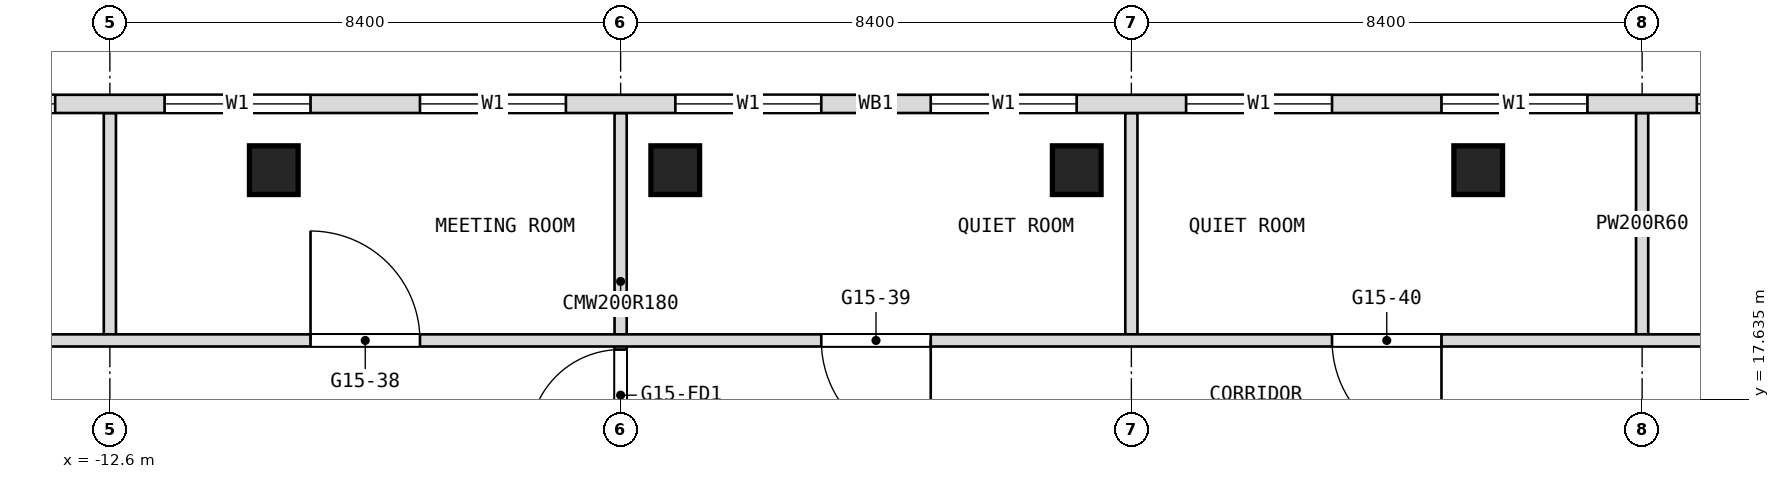
"""IFC4 building model, lengths in metres.
Left out: names, types, materials, properties, quantities, classifications, styles, units other than length and angle.
Written with IfcOpenShell. Run it as: python <this file> out.ifc"""

import sys

from ifc_helpers import new_model, si_unit, direction, frame, frame_2d, origin, origin_2d, place, context, subcontext, project, spatial, rectangle, extrude, element, fill, save


model = new_model("IFC4")
c1 = context("Model", 3, precision=1e-05, world=origin(), true_north=direction((0.0, 1.0)))
c2 = subcontext(c1, "Body", "Model", "MODEL_VIEW")
j1 = project(units=[si_unit("LENGTHUNIT", "METRE"), si_unit("PLANEANGLEUNIT", "RADIAN")], contexts=[c1])
p1 = place(None, origin())
s1 = spatial("IfcSite", under=j1, at=p1, CompositionType="ELEMENT")
p2 = place(p1, origin())
s2 = spatial("IfcBuilding", under=s1, at=p2, CompositionType="ELEMENT")
p3 = place(p2, frame((0.0, 0.0, 194.9)))
s3 = spatial("IfcBuildingStorey", under=s2, at=p3, CompositionType="ELEMENT", Elevation=194.9)
for number, where, z_axis, x_axis in (
    (1, (-9.904, 21.4, 0.0), (0.0, 0.0, 1.0), (1.0, 0.0, 0.0)),
    (2, (-3.302, 21.4, 0.0), (0.0, 0.0, 1.0), (1.0, 0.0, 0.0)),
    (3, (3.302, 21.4, 0.0), (0.0, 0.0, 1.0), (1.0, 0.0, 0.0)),
    (4, (9.904, 21.4, 0.0), (0.0, 0.0, 1.0), (1.0, 0.0, 0.0)),
):
    element("IfcColumn", number, at=place(p3, frame(where, z_axis=z_axis, x_axis=x_axis)), inside=s3, PredefinedType="COLUMN", context=c2, shape_type="SweptSolid", body=[
        extrude(rectangle(XDim=0.8, YDim=0.8, at=origin_2d()), origin(), (0.0, 0.0, 1.0), 3.6),
    ])
for number, where, z_axis, x_axis in (
    (5, (12.6, 18.7, 0.0), (0.0, 0.0, 1.0), (0.0, 1.0, 0.0)),
    (6, (4.2, 18.7, 0.0), (0.0, 0.0, 1.0), (0.0, 1.0, 0.0)),
):
    element("IfcWall", number, at=place(p3, frame(where, z_axis=z_axis, x_axis=x_axis)), inside=s3, PredefinedType="PARTITIONING", context=c2, shape_type="SweptSolid", body=[
        extrude(rectangle(XDim=3.64, YDim=0.2, at=frame_2d((1.82, 0.0))), origin(), (0.0, 0.0, 1.0), 3.34),
    ])
p4 = place(p3, frame((-4.2, 16.8, 0.0), z_axis=(0.0, 0.0, 1.0), x_axis=(0.0, 1.0, 0.0)))
e7 = element("IfcWall", 7, at=p4, inside=s3, PredefinedType="PARTITIONING", context=c2, shape_type="SweptSolid", body=[
    extrude(rectangle(XDim=5.54, YDim=0.2, at=frame_2d((2.77, 0.0))), origin(), (0.0, 0.0, 1.0), 3.34),
])
p5 = place(p4, frame((0.15, 0.0, 0.0)))
e8 = element("IfcOpeningElement", 8, at=p5, cuts=e7, PredefinedType="OPENING", context=c2, shape_type="SweptSolid", body=[
    extrude(rectangle(XDim=1.5, YDim=2.1, at=frame_2d((0.75, 1.05))), frame((0.0, 0.1, 0.0), z_axis=(0.0, -1.0, 0.0), x_axis=(1.0, 0.0, 0.0)), (0.0, 0.0, 1.0), 0.2),
])
p6 = place(p3, frame((-12.6, 18.7, 0.0), z_axis=(0.0, 0.0, 1.0), x_axis=(0.0, 1.0, 0.0)))
e9 = element("IfcWall", 9, at=p6, inside=s3, PredefinedType="PARTITIONING", context=c2, shape_type="SweptSolid", body=[
    extrude(rectangle(XDim=3.64, YDim=0.2, at=frame_2d((1.82, 0.0))), origin(), (0.0, 0.0, 1.0), 3.34),
])
p7 = place(p3, frame((-16.9, 18.6, 0.0), z_axis=(0.0, 0.0, 1.0), x_axis=(1.0, 0.0, 0.0)))
e10 = element("IfcWall", 10, at=p7, inside=s3, PredefinedType="PARTITIONING", context=c2, shape_type="SweptSolid", body=[
    extrude(rectangle(XDim=33.8, YDim=0.2, at=frame_2d((16.9, 0.0))), origin(), (0.0, 0.0, 1.0), 3.34),
])
p8 = place(p7, frame((1.7, 0.0, 0.0)))
e11 = element("IfcOpeningElement", 11, at=p8, cuts=e10, PredefinedType="OPENING", context=c2, shape_type="SweptSolid", body=[
    extrude(rectangle(XDim=1.0, YDim=2.1, at=frame_2d((0.5, 1.05))), frame((0.0, 0.1, 0.0), z_axis=(0.0, -1.0, 0.0), x_axis=(1.0, 0.0, 0.0)), (0.0, 0.0, 1.0), 0.2),
])
p9 = place(p7, frame((7.6, 0.0, 0.0)))
e12 = element("IfcOpeningElement", 12, at=p9, cuts=e10, PredefinedType="OPENING", context=c2, shape_type="SweptSolid", body=[
    extrude(rectangle(XDim=1.8, YDim=2.1, at=frame_2d((0.9, 1.05))), frame((0.0, 0.1, 0.0), z_axis=(0.0, -1.0, 0.0), x_axis=(1.0, 0.0, 0.0)), (0.0, 0.0, 1.0), 0.2),
])
p10 = place(p7, frame((16.0, 0.0, 0.0)))
e13 = element("IfcOpeningElement", 13, at=p10, cuts=e10, PredefinedType="OPENING", context=c2, shape_type="SweptSolid", body=[
    extrude(rectangle(XDim=1.8, YDim=2.1, at=frame_2d((0.9, 1.05))), frame((0.0, 0.1, 0.0), z_axis=(0.0, -1.0, 0.0), x_axis=(1.0, 0.0, 0.0)), (0.0, 0.0, 1.0), 0.2),
])
p11 = place(p7, frame((24.4, 0.0, 0.0)))
e14 = element("IfcOpeningElement", 14, at=p11, cuts=e10, PredefinedType="OPENING", context=c2, shape_type="SweptSolid", body=[
    extrude(rectangle(XDim=1.8, YDim=2.1, at=frame_2d((0.9, 1.05))), frame((0.0, 0.1, 0.0), z_axis=(0.0, -1.0, 0.0), x_axis=(1.0, 0.0, 0.0)), (0.0, 0.0, 1.0), 0.2),
])
p12 = place(p7, frame((31.1, 0.0, 0.0)))
e15 = element("IfcOpeningElement", 15, at=p12, cuts=e10, PredefinedType="OPENING", context=c2, shape_type="SweptSolid", body=[
    extrude(rectangle(XDim=1.0, YDim=2.1, at=frame_2d((0.5, 1.05))), frame((0.0, 0.1, 0.0), z_axis=(0.0, -1.0, 0.0), x_axis=(1.0, 0.0, 0.0)), (0.0, 0.0, 1.0), 0.2),
])
p13 = place(p3, frame((19.206, 22.49, 0.0), z_axis=(0.0, 0.0, 1.0), x_axis=(-1.0, 0.0, 0.0)))
e16 = element("IfcWall", 16, at=p13, inside=s3, PredefinedType="NOTDEFINED", context=c2, shape_type="SweptSolid", body=[
    extrude(rectangle(XDim=38.412, YDim=0.3, at=frame_2d((19.206, 0.0))), origin(), (0.0, 0.0, 1.0), 3.6),
])
p14 = place(p13, frame((3.306, 0.0, 0.9)))
e17 = element("IfcOpeningElement", 17, at=p14, cuts=e16, PredefinedType="OPENING", context=c2, shape_type="SweptSolid", body=[
    extrude(rectangle(XDim=2.4, YDim=2.1, at=frame_2d((1.2, 1.05))), frame((0.0, 0.15, 0.0), z_axis=(0.0, -1.0, 0.0), x_axis=(1.0, 0.0, 0.0)), (0.0, 0.0, 1.0), 0.3),
])
p15 = place(p13, frame((7.506, 0.0, 0.9)))
e18 = element("IfcOpeningElement", 18, at=p15, cuts=e16, PredefinedType="OPENING", context=c2, shape_type="SweptSolid", body=[
    extrude(rectangle(XDim=2.4, YDim=2.1, at=frame_2d((1.2, 1.05))), frame((0.0, 0.15, 0.0), z_axis=(0.0, -1.0, 0.0), x_axis=(1.0, 0.0, 0.0)), (0.0, 0.0, 1.0), 0.3),
])
p16 = place(p13, frame((11.706, 0.0, 0.9)))
e19 = element("IfcOpeningElement", 19, at=p16, cuts=e16, PredefinedType="OPENING", context=c2, shape_type="SweptSolid", body=[
    extrude(rectangle(XDim=2.4, YDim=2.1, at=frame_2d((1.2, 1.05))), frame((0.0, 0.15, 0.0), z_axis=(0.0, -1.0, 0.0), x_axis=(1.0, 0.0, 0.0)), (0.0, 0.0, 1.0), 0.3),
])
p17 = place(p13, frame((15.906, 0.0, 0.9)))
e20 = element("IfcOpeningElement", 20, at=p17, cuts=e16, PredefinedType="OPENING", context=c2, shape_type="SweptSolid", body=[
    extrude(rectangle(XDim=2.4, YDim=2.1, at=frame_2d((1.2, 1.05))), frame((0.0, 0.15, 0.0), z_axis=(0.0, -1.0, 0.0), x_axis=(1.0, 0.0, 0.0)), (0.0, 0.0, 1.0), 0.3),
])
p18 = place(p13, frame((20.106, 0.0, 0.9)))
e21 = element("IfcOpeningElement", 21, at=p18, cuts=e16, PredefinedType="OPENING", context=c2, shape_type="SweptSolid", body=[
    extrude(rectangle(XDim=2.4, YDim=2.1, at=frame_2d((1.2, 1.05))), frame((0.0, 0.15, 0.0), z_axis=(0.0, -1.0, 0.0), x_axis=(1.0, 0.0, 0.0)), (0.0, 0.0, 1.0), 0.3),
])
p19 = place(p13, frame((24.306, 0.0, 0.9)))
e22 = element("IfcOpeningElement", 22, at=p19, cuts=e16, PredefinedType="OPENING", context=c2, shape_type="SweptSolid", body=[
    extrude(rectangle(XDim=2.4, YDim=2.1, at=frame_2d((1.2, 1.05))), frame((0.0, 0.15, 0.0), z_axis=(0.0, -1.0, 0.0), x_axis=(1.0, 0.0, 0.0)), (0.0, 0.0, 1.0), 0.3),
])
p20 = place(p13, frame((28.506, 0.0, 0.9)))
e23 = element("IfcOpeningElement", 23, at=p20, cuts=e16, PredefinedType="OPENING", context=c2, shape_type="SweptSolid", body=[
    extrude(rectangle(XDim=2.4, YDim=2.1, at=frame_2d((1.2, 1.05))), frame((0.0, 0.15, 0.0), z_axis=(0.0, -1.0, 0.0), x_axis=(1.0, 0.0, 0.0)), (0.0, 0.0, 1.0), 0.3),
])
p21 = place(p13, frame((32.706, 0.0, 0.9)))
e24 = element("IfcOpeningElement", 24, at=p21, cuts=e16, PredefinedType="OPENING", context=c2, shape_type="SweptSolid", body=[
    extrude(rectangle(XDim=2.4, YDim=2.1, at=frame_2d((1.2, 1.05))), frame((0.0, 0.15, 0.0), z_axis=(0.0, -1.0, 0.0), x_axis=(1.0, 0.0, 0.0)), (0.0, 0.0, 1.0), 0.3),
])
p22 = place(p9, origin())
e25 = element("IfcDoor", 25, at=p22, inside=s3, OperationType="DOUBLE_DOOR_SINGLE_SWING", PredefinedType="DOOR", context=c2, shape_type="SweptSolid", body=[
    extrude(rectangle(XDim=1.8, YDim=2.1, at=frame_2d((0.9, 1.05))), frame((0.0, 0.025, 0.0), z_axis=(0.0, -1.0, 0.0), x_axis=(1.0, 0.0, 0.0)), (0.0, 0.0, 1.0), 0.05),
])
fill(e12, e25)
p23 = place(p10, origin())
e26 = element("IfcDoor", 26, at=p23, inside=s3, OperationType="DOUBLE_DOOR_SINGLE_SWING", PredefinedType="DOOR", context=c2, shape_type="SweptSolid", body=[
    extrude(rectangle(XDim=1.8, YDim=2.1, at=frame_2d((0.9, 1.05))), frame((0.0, 0.025, 0.0), z_axis=(0.0, -1.0, 0.0), x_axis=(1.0, 0.0, 0.0)), (0.0, 0.0, 1.0), 0.05),
])
fill(e13, e26)
p24 = place(p11, origin())
e27 = element("IfcDoor", 27, at=p24, inside=s3, OperationType="DOUBLE_DOOR_SINGLE_SWING", PredefinedType="DOOR", context=c2, shape_type="SweptSolid", body=[
    extrude(rectangle(XDim=1.8, YDim=2.1, at=frame_2d((0.9, 1.05))), frame((0.0, 0.025, 0.0), z_axis=(0.0, -1.0, 0.0), x_axis=(1.0, 0.0, 0.0)), (0.0, 0.0, 1.0), 0.05),
])
fill(e14, e27)
p25 = place(p14, origin())
e28 = element("IfcWindow", 28, at=p25, inside=s3, PartitioningType="SINGLE_PANEL", PredefinedType="WINDOW", context=c2, shape_type="SweptSolid", body=[
    extrude(rectangle(XDim=2.4, YDim=2.1, at=frame_2d((1.2, 1.05))), frame((0.0, 0.03, 0.0), z_axis=(0.0, -1.0, 0.0), x_axis=(1.0, 0.0, 0.0)), (0.0, 0.0, 1.0), 0.06),
])
fill(e17, e28)
p26 = place(p15, origin())
e29 = element("IfcWindow", 29, at=p26, inside=s3, PartitioningType="SINGLE_PANEL", PredefinedType="WINDOW", context=c2, shape_type="SweptSolid", body=[
    extrude(rectangle(XDim=2.4, YDim=2.1, at=frame_2d((1.2, 1.05))), frame((0.0, 0.03, 0.0), z_axis=(0.0, -1.0, 0.0), x_axis=(1.0, 0.0, 0.0)), (0.0, 0.0, 1.0), 0.06),
])
fill(e18, e29)
p27 = place(p16, origin())
e30 = element("IfcWindow", 30, at=p27, inside=s3, PartitioningType="SINGLE_PANEL", PredefinedType="WINDOW", context=c2, shape_type="SweptSolid", body=[
    extrude(rectangle(XDim=2.4, YDim=2.1, at=frame_2d((1.2, 1.05))), frame((0.0, 0.03, 0.0), z_axis=(0.0, -1.0, 0.0), x_axis=(1.0, 0.0, 0.0)), (0.0, 0.0, 1.0), 0.06),
])
fill(e19, e30)
p28 = place(p17, origin())
e31 = element("IfcWindow", 31, at=p28, inside=s3, PartitioningType="SINGLE_PANEL", PredefinedType="WINDOW", context=c2, shape_type="SweptSolid", body=[
    extrude(rectangle(XDim=2.4, YDim=2.1, at=frame_2d((1.2, 1.05))), frame((0.0, 0.03, 0.0), z_axis=(0.0, -1.0, 0.0), x_axis=(1.0, 0.0, 0.0)), (0.0, 0.0, 1.0), 0.06),
])
fill(e20, e31)
p29 = place(p18, origin())
e32 = element("IfcWindow", 32, at=p29, inside=s3, PartitioningType="SINGLE_PANEL", PredefinedType="WINDOW", context=c2, shape_type="SweptSolid", body=[
    extrude(rectangle(XDim=2.4, YDim=2.1, at=frame_2d((1.2, 1.05))), frame((0.0, 0.03, 0.0), z_axis=(0.0, -1.0, 0.0), x_axis=(1.0, 0.0, 0.0)), (0.0, 0.0, 1.0), 0.06),
])
fill(e21, e32)
p30 = place(p19, origin())
e33 = element("IfcWindow", 33, at=p30, inside=s3, PartitioningType="SINGLE_PANEL", PredefinedType="WINDOW", context=c2, shape_type="SweptSolid", body=[
    extrude(rectangle(XDim=2.4, YDim=2.1, at=frame_2d((1.2, 1.05))), frame((0.0, 0.03, 0.0), z_axis=(0.0, -1.0, 0.0), x_axis=(1.0, 0.0, 0.0)), (0.0, 0.0, 1.0), 0.06),
])
fill(e22, e33)
p31 = place(p20, origin())
e34 = element("IfcWindow", 34, at=p31, inside=s3, PartitioningType="SINGLE_PANEL", PredefinedType="WINDOW", context=c2, shape_type="SweptSolid", body=[
    extrude(rectangle(XDim=2.4, YDim=2.1, at=frame_2d((1.2, 1.05))), frame((0.0, 0.03, 0.0), z_axis=(0.0, -1.0, 0.0), x_axis=(1.0, 0.0, 0.0)), (0.0, 0.0, 1.0), 0.06),
])
fill(e23, e34)
p32 = place(p21, origin())
e35 = element("IfcWindow", 35, at=p32, inside=s3, PartitioningType="SINGLE_PANEL", PredefinedType="WINDOW", context=c2, shape_type="SweptSolid", body=[
    extrude(rectangle(XDim=2.4, YDim=2.1, at=frame_2d((1.2, 1.05))), frame((0.0, 0.03, 0.0), z_axis=(0.0, -1.0, 0.0), x_axis=(1.0, 0.0, 0.0)), (0.0, 0.0, 1.0), 0.06),
])
fill(e24, e35)
p33 = place(p5, origin())
e36 = element("IfcDoor", 36, at=p33, inside=s3, OperationType="DOUBLE_DOOR_DOUBLE_SWING", PredefinedType="DOOR", context=c2, shape_type="SweptSolid", body=[
    extrude(rectangle(XDim=1.5, YDim=2.1, at=frame_2d((0.75, 1.05))), frame((0.0, 0.025, 0.0), z_axis=(0.0, -1.0, 0.0), x_axis=(1.0, 0.0, 0.0)), (0.0, 0.0, 1.0), 0.05),
])
fill(e8, e36)
save(model, sys.argv[1])
